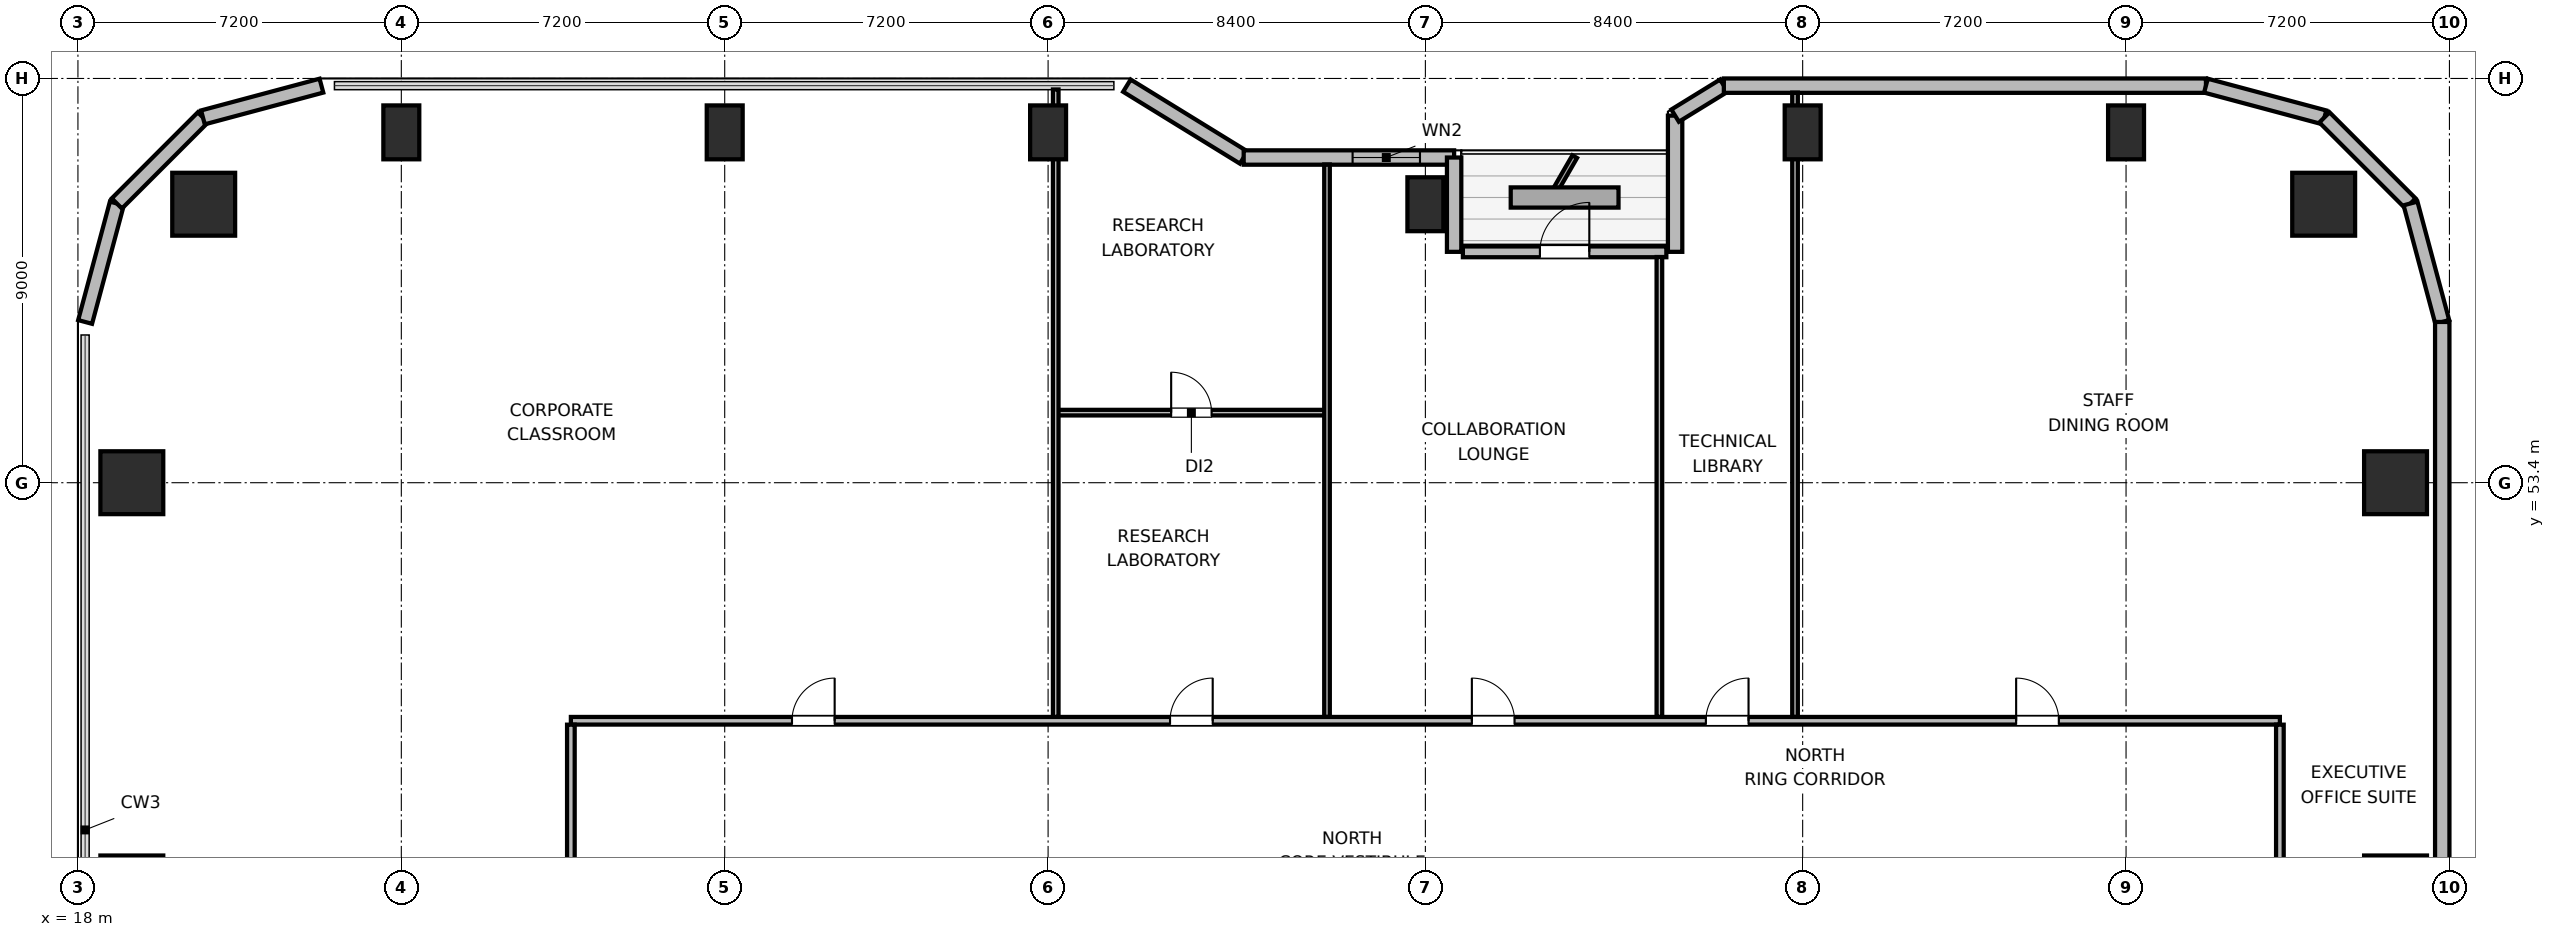
"""IFC4 building model, lengths in metres.
Left out: names, types, materials, properties, quantities, classifications, styles, units other than length and angle.
Written with IfcOpenShell. Run it as: python <this file> out.ifc"""

import sys

from ifc_helpers import new_model, si_unit, direction, frame, frame_2d, origin, origin_2d, place, context, subcontext, project, spatial, rectangle, circle, extrude, element, fill, save


model = new_model("IFC4")
c1 = context("Model", 3, precision=1e-05, world=origin(), true_north=direction((0.0, 1.0)))
c2 = subcontext(c1, "Body", "Model", "MODEL_VIEW")
j1 = project(units=[si_unit("LENGTHUNIT", "METRE"), si_unit("PLANEANGLEUNIT", "RADIAN")], contexts=[c1])
p1 = place(None, origin())
s1 = spatial("IfcSite", under=j1, at=p1, CompositionType="ELEMENT")
p2 = place(p1, origin())
s2 = spatial("IfcBuilding", under=s1, at=p2, CompositionType="ELEMENT")
p3 = place(p2, frame((0.0, 0.0, 97.5)))
s3 = spatial("IfcBuildingStorey", under=s2, at=p3, CompositionType="ELEMENT", Elevation=97.5)
for number, where, z_axis, x_axis in (
    (1, (68.0, 59.6, 0.0), (0.0, 0.0, 1.0), (1.0, 0.0, 0.0)),
    (2, (20.8, 59.6, 0.0), (0.0, 0.0, 1.0), (1.0, 0.0, 0.0)),
):
    element("IfcColumn", number, at=place(p3, frame(where, z_axis=z_axis, x_axis=x_axis)), inside=s3, PredefinedType="COLUMN", context=c2, shape_type="SweptSolid", body=[
        extrude(circle(Radius=0.7, at=origin_2d()), origin(), (0.0, 0.0, 1.0), 3.9),
    ])
for number, where, z_axis, x_axis in (
    (3, (25.2, 61.2, 0.0), (0.0, 0.0, 1.0), (1.0, 0.0, 0.0)),
    (4, (32.4, 61.2, 0.0), (0.0, 0.0, 1.0), (1.0, 0.0, 0.0)),
    (5, (39.6, 61.2, 0.0), (0.0, 0.0, 1.0), (1.0, 0.0, 0.0)),
    (6, (48.0, 59.6, 0.0), (0.0, 0.0, 1.0), (1.0, 0.0, 0.0)),
    (7, (56.4, 61.2, 0.0), (0.0, 0.0, 1.0), (1.0, 0.0, 0.0)),
    (8, (63.6, 61.2, 0.0), (0.0, 0.0, 1.0), (1.0, 0.0, 0.0)),
):
    element("IfcColumn", number, at=place(p3, frame(where, z_axis=z_axis, x_axis=x_axis)), inside=s3, PredefinedType="COLUMN", context=c2, shape_type="SweptSolid", body=[
        extrude(rectangle(XDim=0.8, YDim=1.2, at=origin_2d()), origin(), (0.0, 0.0, 1.0), 3.9),
    ])
for number, where, z_axis, x_axis in (
    (9, (19.2, 44.4, 0.0), (0.0, 0.0, 1.0), (1.0, 0.0, 0.0)),
    (10, (69.6, 44.4, 0.0), (0.0, 0.0, 1.0), (1.0, 0.0, 0.0)),
    (11, (19.2, 53.4, 0.0), (0.0, 0.0, 1.0), (1.0, 0.0, 0.0)),
    (12, (69.6, 53.4, 0.0), (0.0, 0.0, 1.0), (1.0, 0.0, 0.0)),
):
    element("IfcColumn", number, at=place(p3, frame(where, z_axis=z_axis, x_axis=x_axis)), inside=s3, PredefinedType="COLUMN", context=c2, shape_type="SweptSolid", body=[
        extrude(rectangle(XDim=1.4, YDim=1.4, at=origin_2d()), origin(), (0.0, 0.0, 1.0), 3.9),
    ])
p4 = place(p3, frame((18.16, 56.979, 0.0), z_axis=(0.0, 0.0, 1.0), x_axis=(0.25869736047, 0.965958423373, 0.0)))
e13 = element("IfcWall", 13, at=p4, inside=s3, PredefinedType="SOLIDWALL", context=c2, shape_type="SweptSolid", body=[
    extrude(rectangle(XDim=2.731, YDim=0.32, at=frame_2d((1.366, 0.0))), origin(), (0.0, 0.0, 1.0), 3.64),
])
p5 = place(p3, frame((18.866, 59.617, 0.0), z_axis=(0.0, 0.0, 1.0), x_axis=(0.707106781187, 0.707106781187, 0.0)))
e14 = element("IfcWall", 14, at=p5, inside=s3, PredefinedType="SOLIDWALL", context=c2, shape_type="SweptSolid", body=[
    extrude(rectangle(XDim=2.71, YDim=0.32, at=frame_2d((1.355, 0.0))), origin(), (0.0, 0.0, 1.0), 3.64),
])
p6 = place(p3, frame((20.783, 61.533, 0.0), z_axis=(0.0, 0.0, 1.0), x_axis=(0.965964405026, 0.25867502435, 0.0)))
e15 = element("IfcWall", 15, at=p6, inside=s3, PredefinedType="SOLIDWALL", context=c2, shape_type="SweptSolid", body=[
    extrude(rectangle(XDim=2.731, YDim=0.32, at=frame_2d((1.366, 0.0))), origin(), (0.0, 0.0, 1.0), 3.64),
])
p7 = place(p3, frame((41.355, 62.24, 0.0), z_axis=(0.0, 0.0, 1.0), x_axis=(0.851630857047, -0.524142044989, 0.0)))
e16 = element("IfcWall", 16, at=p7, inside=s3, PredefinedType="SOLIDWALL", context=c2, shape_type="SweptSolid", body=[
    extrude(rectangle(XDim=3.053, YDim=0.32, at=frame_2d((1.526, 0.0))), origin(), (0.0, 0.0, 1.0), 2.875),
])
p8 = place(p3, frame((43.955, 60.64, 0.0), z_axis=(0.0, 0.0, 1.0), x_axis=(1.0, 0.0, 0.0)))
e17 = element("IfcWall", 17, at=p8, inside=s3, PredefinedType="SOLIDWALL", context=c2, shape_type="SweptSolid", body=[
    extrude(rectangle(XDim=4.685, YDim=0.32, at=frame_2d((2.343, 0.0))), origin(), (0.0, 0.0, 1.0), 2.875),
])
p9 = place(p8, frame((2.425, 0.0, 0.85)))
e18 = element("IfcOpeningElement", 18, at=p9, cuts=e17, PredefinedType="OPENING", context=c2, shape_type="SweptSolid", body=[
    extrude(rectangle(XDim=1.5, YDim=1.1, at=frame_2d((0.75, 0.55))), frame((0.0, 0.17, 0.0), z_axis=(0.0, -1.0, 0.0), x_axis=(1.0, 0.0, 0.0)), (0.0, 0.0, 1.0), 0.34),
])
p10 = place(p3, frame((48.64, 60.64, 0.0), z_axis=(0.0, 0.0, 1.0), x_axis=(0.0, -1.0, 0.0)))
e19 = element("IfcWall", 19, at=p10, inside=s3, PredefinedType="SOLIDWALL", context=c2, shape_type="SweptSolid", body=[
    extrude(rectangle(XDim=2.1, YDim=0.32, at=frame_2d((1.05, 0.0))), origin(), (0.0, 0.0, 1.0), 2.875),
])
p11 = place(p3, frame((48.835, 58.54, 0.0), z_axis=(0.0, 0.0, 1.0), x_axis=(1.0, 0.0, 0.0)))
e20 = element("IfcWall", 20, at=p11, inside=s3, PredefinedType="SOLIDWALL", context=c2, shape_type="SweptSolid", body=[
    extrude(rectangle(XDim=4.53, YDim=0.24, at=frame_2d((2.265, 0.0))), origin(), (0.0, 0.0, 1.0), 3.64),
])
p12 = place(p11, frame((1.715, 0.0, 0.0)))
e21 = element("IfcOpeningElement", 21, at=p12, cuts=e20, PredefinedType="OPENING", context=c2, shape_type="SweptSolid", body=[
    extrude(rectangle(XDim=1.1, YDim=2.04, at=frame_2d((0.55, 1.02))), frame((0.0, 0.13, 0.0), z_axis=(0.0, -1.0, 0.0), x_axis=(1.0, 0.0, 0.0)), (0.0, 0.0, 1.0), 0.26),
])
p13 = place(p3, frame((53.56, 58.54, 0.0), z_axis=(0.0, 0.0, 1.0), x_axis=(0.0, 1.0, 0.0)))
e22 = element("IfcWall", 22, at=p13, inside=s3, PredefinedType="SOLIDWALL", context=c2, shape_type="SweptSolid", body=[
    extrude(rectangle(XDim=3.032, YDim=0.32, at=frame_2d((1.516, 0.0))), origin(), (0.0, 0.0, 1.0), 2.875),
])
p14 = place(p3, frame((53.56, 61.573, 0.0), z_axis=(0.0, 0.0, 1.0), x_axis=(0.851776724646, 0.523904964045, 0.0)))
e23 = element("IfcWall", 23, at=p14, inside=s3, PredefinedType="SOLIDWALL", context=c2, shape_type="SweptSolid", body=[
    extrude(rectangle(XDim=1.274, YDim=0.32, at=frame_2d((0.637, 0.0))), origin(), (0.0, 0.0, 1.0), 3.64),
])
p15 = place(p3, frame((54.645, 62.24, 0.0), z_axis=(0.0, 0.0, 1.0), x_axis=(1.0, 0.0, 0.0)))
e24 = element("IfcWall", 24, at=p15, inside=s3, PredefinedType="SOLIDWALL", context=c2, shape_type="SweptSolid", body=[
    extrude(rectangle(XDim=10.734, YDim=0.32, at=frame_2d((5.367, 0.0))), origin(), (0.0, 0.0, 1.0), 3.64),
])
p16 = place(p3, frame((65.379, 62.24, 0.0), z_axis=(0.0, 0.0, 1.0), x_axis=(0.965958423373, -0.25869736047, 0.0)))
e25 = element("IfcWall", 25, at=p16, inside=s3, PredefinedType="SOLIDWALL", context=c2, shape_type="SweptSolid", body=[
    extrude(rectangle(XDim=2.731, YDim=0.32, at=frame_2d((1.366, 0.0))), origin(), (0.0, 0.0, 1.0), 3.64),
])
p17 = place(p3, frame((68.017, 61.533, 0.0), z_axis=(0.0, 0.0, 1.0), x_axis=(0.707151821269, -0.707061738235, 0.0)))
e26 = element("IfcWall", 26, at=p17, inside=s3, PredefinedType="SOLIDWALL", context=c2, shape_type="SweptSolid", body=[
    extrude(rectangle(XDim=2.71, YDim=0.32, at=frame_2d((1.355, 0.0))), origin(), (0.0, 0.0, 1.0), 3.64),
])
p18 = place(p3, frame((69.934, 59.617, 0.0), z_axis=(0.0, 0.0, 1.0), x_axis=(0.258613949072, -0.965980758269, 0.0)))
e27 = element("IfcWall", 27, at=p18, inside=s3, PredefinedType="SOLIDWALL", context=c2, shape_type="SweptSolid", body=[
    extrude(rectangle(XDim=2.731, YDim=0.32, at=frame_2d((1.366, 0.0))), origin(), (0.0, 0.0, 1.0), 3.64),
])
p19 = place(p3, frame((70.64, 56.979, 0.0), z_axis=(0.0, 0.0, 1.0), x_axis=(0.0, -1.0, 0.0)))
e28 = element("IfcWall", 28, at=p19, inside=s3, PredefinedType="SOLIDWALL", context=c2, shape_type="SweptSolid", body=[
    extrude(rectangle(XDim=14.219, YDim=0.32, at=frame_2d((7.109, 0.0))), origin(), (0.0, 0.0, 1.0), 3.64),
])
p20 = place(p3, frame((28.975, 48.1, 0.0), z_axis=(0.0, 0.0, 1.0), x_axis=(1.0, 0.0, 0.0)))
e29 = element("IfcWall", 29, at=p20, inside=s3, PredefinedType="PARTITIONING", context=c2, shape_type="SweptSolid", body=[
    extrude(rectangle(XDim=38.05, YDim=0.17, at=frame_2d((19.025, 0.0))), origin(), (0.0, 0.0, 1.0), 3.64),
])
p21 = place(p20, frame((4.923, 0.0, 0.0)))
e30 = element("IfcOpeningElement", 30, at=p21, cuts=e29, PredefinedType="OPENING", context=c2, shape_type="SweptSolid", body=[
    extrude(rectangle(XDim=0.95, YDim=2.04, at=frame_2d((0.475, 1.02))), frame((0.0, 0.095, 0.0), z_axis=(0.0, -1.0, 0.0), x_axis=(1.0, 0.0, 0.0)), (0.0, 0.0, 1.0), 0.19),
])
p22 = place(p20, frame((13.34, 0.0, 0.0)))
e31 = element("IfcOpeningElement", 31, at=p22, cuts=e29, PredefinedType="OPENING", context=c2, shape_type="SweptSolid", body=[
    extrude(rectangle(XDim=0.95, YDim=2.04, at=frame_2d((0.475, 1.02))), frame((0.0, 0.095, 0.0), z_axis=(0.0, -1.0, 0.0), x_axis=(1.0, 0.0, 0.0)), (0.0, 0.0, 1.0), 0.19),
])
p23 = place(p20, frame((20.06, 0.0, 0.0)))
e32 = element("IfcOpeningElement", 32, at=p23, cuts=e29, PredefinedType="OPENING", context=c2, shape_type="SweptSolid", body=[
    extrude(rectangle(XDim=0.95, YDim=2.04, at=frame_2d((0.475, 1.02))), frame((0.0, 0.095, 0.0), z_axis=(0.0, -1.0, 0.0), x_axis=(1.0, 0.0, 0.0)), (0.0, 0.0, 1.0), 0.19),
])
p24 = place(p20, frame((25.27, 0.0, 0.0)))
e33 = element("IfcOpeningElement", 33, at=p24, cuts=e29, PredefinedType="OPENING", context=c2, shape_type="SweptSolid", body=[
    extrude(rectangle(XDim=0.95, YDim=2.04, at=frame_2d((0.475, 1.02))), frame((0.0, 0.095, 0.0), z_axis=(0.0, -1.0, 0.0), x_axis=(1.0, 0.0, 0.0)), (0.0, 0.0, 1.0), 0.19),
])
p25 = place(p20, frame((32.178, 0.0, 0.0)))
e34 = element("IfcOpeningElement", 34, at=p25, cuts=e29, PredefinedType="OPENING", context=c2, shape_type="SweptSolid", body=[
    extrude(rectangle(XDim=0.95, YDim=2.04, at=frame_2d((0.475, 1.02))), frame((0.0, 0.095, 0.0), z_axis=(0.0, -1.0, 0.0), x_axis=(1.0, 0.0, 0.0)), (0.0, 0.0, 1.0), 0.19),
])
p26 = place(p3, frame((28.975, 23.987, 0.0), z_axis=(0.0, 0.0, 1.0), x_axis=(0.0, 1.0, 0.0)))
e35 = element("IfcWall", 35, at=p26, inside=s3, PredefinedType="PARTITIONING", context=c2, shape_type="SweptSolid", body=[
    extrude(rectangle(XDim=24.026, YDim=0.17, at=frame_2d((12.013, 0.0))), origin(), (0.0, 0.0, 1.0), 3.64),
])
p27 = place(p26, frame((11.538, 0.0, 0.0)))
e36 = element("IfcOpeningElement", 36, at=p27, cuts=e35, PredefinedType="OPENING", context=c2, shape_type="SweptSolid", body=[
    extrude(rectangle(XDim=0.95, YDim=2.04, at=frame_2d((0.475, 1.02))), frame((0.0, 0.095, 0.0), z_axis=(0.0, -1.0, 0.0), x_axis=(1.0, 0.0, 0.0)), (0.0, 0.0, 1.0), 0.19),
])
p28 = place(p3, frame((67.025, 23.987, 0.0), z_axis=(0.0, 0.0, 1.0), x_axis=(0.0, 1.0, 0.0)))
e37 = element("IfcWall", 37, at=p28, inside=s3, PredefinedType="PARTITIONING", context=c2, shape_type="SweptSolid", body=[
    extrude(rectangle(XDim=24.026, YDim=0.17, at=frame_2d((12.013, 0.0))), origin(), (0.0, 0.0, 1.0), 3.64),
])
p29 = place(p28, frame((6.088, 0.0, 0.0)))
e38 = element("IfcOpeningElement", 38, at=p29, cuts=e37, PredefinedType="OPENING", context=c2, shape_type="SweptSolid", body=[
    extrude(rectangle(XDim=0.95, YDim=2.04, at=frame_2d((0.475, 1.02))), frame((0.0, 0.095, 0.0), z_axis=(0.0, -1.0, 0.0), x_axis=(1.0, 0.0, 0.0)), (0.0, 0.0, 1.0), 0.19),
])
p30 = place(p28, frame((18.188, 0.0, 0.0)))
e39 = element("IfcOpeningElement", 39, at=p30, cuts=e37, PredefinedType="OPENING", context=c2, shape_type="SweptSolid", body=[
    extrude(rectangle(XDim=0.95, YDim=2.04, at=frame_2d((0.475, 1.02))), frame((0.0, 0.095, 0.0), z_axis=(0.0, -1.0, 0.0), x_axis=(1.0, 0.0, 0.0)), (0.0, 0.0, 1.0), 0.19),
])
p31 = place(p3, frame((39.77, 54.96, 0.0), z_axis=(0.0, 0.0, 1.0), x_axis=(1.0, 0.0, 0.0)))
e40 = element("IfcWall", 40, at=p31, inside=s3, PredefinedType="PARTITIONING", context=c2, shape_type="SweptSolid", body=[
    extrude(rectangle(XDim=6.04, YDim=0.125, at=frame_2d((3.02, 0.0))), origin(), (0.0, 0.0, 1.0), 3.64),
])
p32 = place(p31, frame((2.57, 0.0, 0.0)))
e41 = element("IfcOpeningElement", 41, at=p32, cuts=e40, PredefinedType="OPENING", context=c2, shape_type="SweptSolid", body=[
    extrude(rectangle(XDim=0.9, YDim=2.02, at=frame_2d((0.45, 1.01))), frame((0.0, 0.073, 0.0), z_axis=(0.0, -1.0, 0.0), x_axis=(1.0, 0.0, 0.0)), (0.0, 0.0, 1.0), 0.145),
])
p33 = place(p3, frame((39.77, 48.187, 0.0), z_axis=(0.0, 0.0, 1.0), x_axis=(0.0, 1.0, 0.0)))
e42 = element("IfcWall", 42, at=p33, inside=s3, PredefinedType="PARTITIONING", context=c2, shape_type="SweptSolid", body=[
    extrude(rectangle(XDim=13.968, YDim=0.125, at=frame_2d((6.984, 0.0))), origin(), (0.0, 0.0, 1.0), 3.003),
])
p34 = place(p3, frame((45.81, 48.187, 0.0), z_axis=(0.0, 0.0, 1.0), x_axis=(0.0, 1.0, 0.0)))
e43 = element("IfcWall", 43, at=p34, inside=s3, PredefinedType="PARTITIONING", context=c2, shape_type="SweptSolid", body=[
    extrude(rectangle(XDim=12.298, YDim=0.125, at=frame_2d((6.149, 0.0))), origin(), (0.0, 0.0, 1.0), 3.64),
])
p35 = place(p3, frame((53.21, 48.187, 0.0), z_axis=(0.0, 0.0, 1.0), x_axis=(0.0, 1.0, 0.0)))
e44 = element("IfcWall", 44, at=p35, inside=s3, PredefinedType="PARTITIONING", context=c2, shape_type="SweptSolid", body=[
    extrude(rectangle(XDim=10.238, YDim=0.125, at=frame_2d((5.119, 0.0))), origin(), (0.0, 0.0, 1.0), 3.003),
])
p36 = place(p3, frame((56.23, 48.187, 0.0), z_axis=(0.0, 0.0, 1.0), x_axis=(0.0, 1.0, 0.0)))
e45 = element("IfcWall", 45, at=p36, inside=s3, PredefinedType="PARTITIONING", context=c2, shape_type="SweptSolid", body=[
    extrude(rectangle(XDim=13.898, YDim=0.125, at=frame_2d((6.949, 0.0))), origin(), (0.0, 0.0, 1.0), 3.003),
])
p37 = place(p9, origin())
e46 = element("IfcWindow", 46, at=p37, inside=s3, PartitioningType="SINGLE_PANEL", PredefinedType="WINDOW", context=c2, shape_type="SweptSolid", body=[
    extrude(rectangle(XDim=1.5, YDim=1.1, at=frame_2d((0.75, 0.55))), frame((0.0, 0.03, 0.0), z_axis=(0.0, -1.0, 0.0), x_axis=(1.0, 0.0, 0.0)), (0.0, 0.0, 1.0), 0.06),
])
fill(e18, e46)
p38 = place(p12, origin())
e47 = element("IfcDoor", 47, at=p38, inside=s3, OperationType="SINGLE_SWING_RIGHT", PredefinedType="DOOR", context=c2, shape_type="SweptSolid", body=[
    extrude(rectangle(XDim=1.1, YDim=2.04, at=frame_2d((0.55, 1.02))), frame((0.0, 0.025, 0.0), z_axis=(0.0, -1.0, 0.0), x_axis=(1.0, 0.0, 0.0)), (0.0, 0.0, 1.0), 0.05),
])
fill(e21, e47)
p39 = place(p21, origin())
e48 = element("IfcDoor", 48, at=p39, inside=s3, OperationType="SINGLE_SWING_RIGHT", PredefinedType="DOOR", context=c2, shape_type="SweptSolid", body=[
    extrude(rectangle(XDim=0.95, YDim=2.04, at=frame_2d((0.475, 1.02))), frame((0.0, 0.025, 0.0), z_axis=(0.0, -1.0, 0.0), x_axis=(1.0, 0.0, 0.0)), (0.0, 0.0, 1.0), 0.05),
])
fill(e30, e48)
p40 = place(p32, origin())
e49 = element("IfcDoor", 49, at=p40, inside=s3, OperationType="SINGLE_SWING_LEFT", PredefinedType="DOOR", context=c2, shape_type="SweptSolid", body=[
    extrude(rectangle(XDim=0.9, YDim=2.02, at=frame_2d((0.45, 1.01))), frame((0.0, 0.025, 0.0), z_axis=(0.0, -1.0, 0.0), x_axis=(1.0, 0.0, 0.0)), (0.0, 0.0, 1.0), 0.05),
])
fill(e41, e49)
p41 = place(p22, origin())
e50 = element("IfcDoor", 50, at=p41, inside=s3, OperationType="SINGLE_SWING_RIGHT", PredefinedType="DOOR", context=c2, shape_type="SweptSolid", body=[
    extrude(rectangle(XDim=0.95, YDim=2.04, at=frame_2d((0.475, 1.02))), frame((0.0, 0.025, 0.0), z_axis=(0.0, -1.0, 0.0), x_axis=(1.0, 0.0, 0.0)), (0.0, 0.0, 1.0), 0.05),
])
fill(e31, e50)
p42 = place(p23, origin())
e51 = element("IfcDoor", 51, at=p42, inside=s3, OperationType="SINGLE_SWING_LEFT", PredefinedType="DOOR", context=c2, shape_type="SweptSolid", body=[
    extrude(rectangle(XDim=0.95, YDim=2.04, at=frame_2d((0.475, 1.02))), frame((0.0, 0.025, 0.0), z_axis=(0.0, -1.0, 0.0), x_axis=(1.0, 0.0, 0.0)), (0.0, 0.0, 1.0), 0.05),
])
fill(e32, e51)
p43 = place(p24, origin())
e52 = element("IfcDoor", 52, at=p43, inside=s3, OperationType="SINGLE_SWING_RIGHT", PredefinedType="DOOR", context=c2, shape_type="SweptSolid", body=[
    extrude(rectangle(XDim=0.95, YDim=2.04, at=frame_2d((0.475, 1.02))), frame((0.0, 0.025, 0.0), z_axis=(0.0, -1.0, 0.0), x_axis=(1.0, 0.0, 0.0)), (0.0, 0.0, 1.0), 0.05),
])
fill(e33, e52)
p44 = place(p25, origin())
e53 = element("IfcDoor", 53, at=p44, inside=s3, OperationType="SINGLE_SWING_LEFT", PredefinedType="DOOR", context=c2, shape_type="SweptSolid", body=[
    extrude(rectangle(XDim=0.95, YDim=2.04, at=frame_2d((0.475, 1.02))), frame((0.0, 0.025, 0.0), z_axis=(0.0, -1.0, 0.0), x_axis=(1.0, 0.0, 0.0)), (0.0, 0.0, 1.0), 0.05),
])
fill(e34, e53)
save(model, sys.argv[1])
